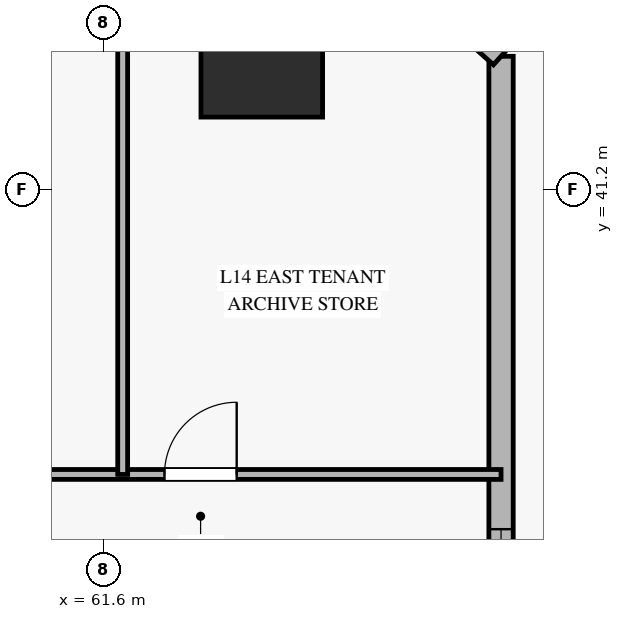
"""IFC4 building model, lengths in metres.
Left out: names, types, materials, properties, quantities, classifications, styles, units other than length and angle.
Written with IfcOpenShell. Run it as: python <this file> out.ifc"""

import sys

from ifc_helpers import new_model, si_unit, direction, frame, frame_2d, origin, origin_2d, place, context, subcontext, project, spatial, rectangle, hollow_rectangle, extrude, source, transform, mapped, element, fill, save


model = new_model("IFC4")
c1 = context("Model", 3, precision=1e-05, world=origin(), true_north=direction((0.0, 1.0)))
c2 = subcontext(c1, "Body", "Model", "MODEL_VIEW")
j1 = project(units=[si_unit("LENGTHUNIT", "METRE"), si_unit("PLANEANGLEUNIT", "RADIAN")], contexts=[c1])
p1 = place(None, origin())
s1 = spatial("IfcSite", under=j1, at=p1, CompositionType="ELEMENT")
p2 = place(p1, origin())
s2 = spatial("IfcBuilding", under=s1, at=p2, CompositionType="ELEMENT")
p3 = place(p2, frame((0.0, 0.0, 57.2)))
s3 = spatial("IfcBuildingStorey", under=s2, at=p3, CompositionType="ELEMENT", Elevation=57.2)
m1 = source(origin(), c2, "Body", "SweptSolid", [
    extrude(hollow_rectangle(XDim=1.6, YDim=1.6, WallThickness=0.075, at=origin_2d()), origin(), (0.0, 0.0, 1.0), 3.686),
])
p4 = place(p3, frame((63.682, 42.952, 0.0), z_axis=(-0.05636738431, 0.007087320941, 0.998384939724), x_axis=(-0.124752184173, -0.992187932069, 0.0)))
e1 = element("IfcColumn", 1, at=p4, inside=s3, PredefinedType="COLUMN", context=c2, shape_type="MappedRepresentation", body=[
    mapped(m1, transform((0.0, 0.0, 0.0), x_axis=(1.0, 0.0, 0.0), y_axis=(0.0, 1.0, 0.0), z_axis=(0.0, 0.0, 1.0), scale=1.0)),
])
p5 = place(p3, frame((66.83, 25.777, 0.0), z_axis=(0.0, 0.0, 1.0), x_axis=(0.0, 1.0, 0.0)))
e2 = element("IfcWall", 2, at=p5, inside=s3, PredefinedType="SOLIDWALL", context=c2, shape_type="SweptSolid", body=[
    extrude(rectangle(XDim=17.175, YDim=0.32, at=frame_2d((8.587, 0.0))), origin(), (0.0, 0.0, 1.0), 3.16),
])
p6 = place(p5, frame((9.353, 0.0, 0.45)))
e3 = element("IfcOpeningElement", 3, at=p6, cuts=e2, PredefinedType="OPENING", context=c2, shape_type="SweptSolid", body=[
    extrude(rectangle(XDim=1.6, YDim=2.0, at=frame_2d((0.8, 1.0))), frame((0.0, 0.17, 0.0), z_axis=(0.0, -1.0, 0.0), x_axis=(1.0, 0.0, 0.0)), (0.0, 0.0, 1.0), 0.34),
])
p7 = place(p3, frame((66.83, 42.952, 0.0), z_axis=(0.0, 0.0, 1.0), x_axis=(-0.746307341165, 0.665601496785, 0.0)))
e4 = element("IfcWall", 4, at=p7, inside=s3, PredefinedType="SOLIDWALL", context=c2, shape_type="SweptSolid", body=[
    extrude(rectangle(XDim=4.955, YDim=0.3, at=frame_2d((2.478, 0.0))), origin(), (0.0, 0.0, 1.0), 3.16),
])
p8 = place(p7, frame((1.677, 0.0, 0.45)))
e5 = element("IfcOpeningElement", 5, at=p8, cuts=e4, PredefinedType="OPENING", context=c2, shape_type="SweptSolid", body=[
    extrude(rectangle(XDim=1.6, YDim=2.0, at=frame_2d((0.8, 1.0))), frame((0.0, 0.16, 0.0), z_axis=(0.0, -1.0, 0.0), x_axis=(1.0, 0.0, 0.0)), (0.0, 0.0, 1.0), 0.32),
])
p9 = place(p3, frame((51.15, 37.45, 0.0), z_axis=(0.0, 0.0, 1.0), x_axis=(1.0, 0.0, 0.0)))
e6 = element("IfcWall", 6, at=p9, inside=s3, PredefinedType="PARTITIONING", context=c2, shape_type="SweptSolid", body=[
    extrude(rectangle(XDim=15.68, YDim=0.13, at=frame_2d((7.84, 0.0))), origin(), (0.0, 0.0, 1.0), 3.165),
])
p10 = place(p9, frame((0.5, 0.0, 0.0)))
e7 = element("IfcOpeningElement", 7, at=p10, cuts=e6, PredefinedType="OPENING", context=c2, shape_type="SweptSolid", body=[
    extrude(rectangle(XDim=0.9, YDim=2.1, at=frame_2d((0.45, 1.05))), frame((0.0, 0.075, 0.0), z_axis=(0.0, -1.0, 0.0), x_axis=(1.0, 0.0, 0.0)), (0.0, 0.0, 1.0), 0.15),
])
p11 = place(p9, frame((11.252, 0.0, 0.0)))
e8 = element("IfcOpeningElement", 8, at=p11, cuts=e6, PredefinedType="OPENING", context=c2, shape_type="SweptSolid", body=[
    extrude(rectangle(XDim=0.95, YDim=2.1, at=frame_2d((0.475, 1.05))), frame((0.0, 0.075, 0.0), z_axis=(0.0, -1.0, 0.0), x_axis=(1.0, 0.0, 0.0)), (0.0, 0.0, 1.0), 0.15),
])
p12 = place(p3, frame((61.852, 37.45, 0.0), z_axis=(0.0, 0.0, 1.0), x_axis=(0.0, 1.0, 0.0)))
e9 = element("IfcWall", 9, at=p12, inside=s3, PredefinedType="PARTITIONING", context=c2, shape_type="SweptSolid", body=[
    extrude(rectangle(XDim=8.8, YDim=0.13, at=frame_2d((4.4, 0.0))), origin(), (0.0, 0.0, 1.0), 3.68),
])
m2 = source(origin(), c2, "Body", "SweptSolid", [
    extrude(rectangle(XDim=1.6, YDim=2.0, at=frame_2d((0.8, 1.0))), frame((0.0, 0.03, 0.0), z_axis=(0.0, -1.0, 0.0), x_axis=(1.0, 0.0, 0.0)), (0.0, 0.0, 1.0), 0.06),
])
p13 = place(p6, origin())
e10 = element("IfcWindow", 10, at=p13, inside=s3, PartitioningType="SINGLE_PANEL", PredefinedType="WINDOW", context=c2, shape_type="MappedRepresentation", body=[
    mapped(m2, transform((0.0, 0.0, 0.0), x_axis=(1.0, 0.0, 0.0), y_axis=(0.0, 1.0, 0.0), z_axis=(0.0, 0.0, 1.0), scale=1.0)),
])
fill(e3, e10)
m3 = source(origin(), c2, "Body", "SweptSolid", [
    extrude(rectangle(XDim=0.95, YDim=2.1, at=frame_2d((0.475, 1.05))), frame((0.0, 0.025, 0.0), z_axis=(0.0, -1.0, 0.0), x_axis=(1.0, 0.0, 0.0)), (0.0, 0.0, 1.0), 0.05),
])
p14 = place(p11, origin())
e11 = element("IfcDoor", 11, at=p14, inside=s3, OperationType="SINGLE_SWING_RIGHT", PredefinedType="DOOR", context=c2, shape_type="MappedRepresentation", body=[
    mapped(m3, transform((0.0, 0.0, 0.0), x_axis=(1.0, 0.0, 0.0), y_axis=(0.0, 1.0, 0.0), z_axis=(0.0, 0.0, 1.0), scale=1.0)),
])
fill(e8, e11)
save(model, sys.argv[1])
